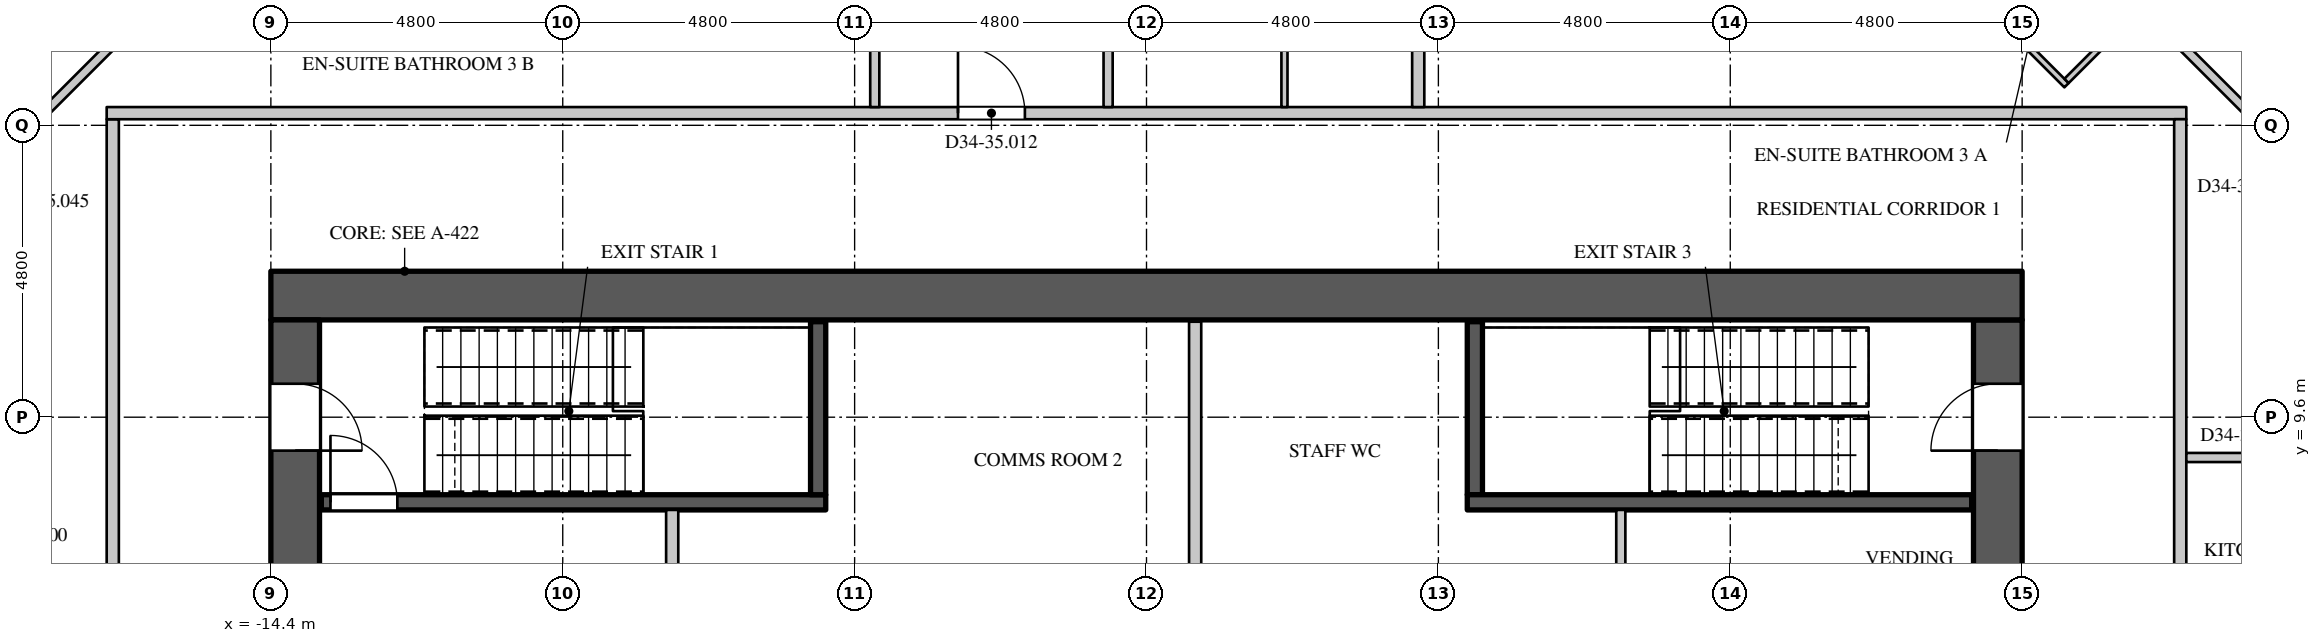
"""IFC4 building model, lengths in metres.
Left out: names, types, materials, properties, quantities, classifications, styles, units other than length and angle.
Written with IfcOpenShell. Run it as: python <this file> out.ifc"""

import sys

from ifc_helpers import new_model, si_unit, direction, frame, frame_2d, origin, place, context, subcontext, project, spatial, rectangle, extrude, element, fill, save


model = new_model("IFC4")
c1 = context("Model", 3, precision=1e-05, world=origin(), true_north=direction((0.0, 1.0)))
c2 = subcontext(c1, "Body", "Model", "MODEL_VIEW")
j1 = project(units=[si_unit("LENGTHUNIT", "METRE"), si_unit("PLANEANGLEUNIT", "RADIAN")], contexts=[c1])
p1 = place(None, origin())
s1 = spatial("IfcSite", under=j1, at=p1, CompositionType="ELEMENT")
p2 = place(p1, origin())
s2 = spatial("IfcBuilding", under=s1, at=p2, CompositionType="ELEMENT")
p3 = place(p2, frame((0.0, 0.0, 148.5)))
s3 = spatial("IfcBuildingStorey", under=s2, at=p3, CompositionType="ELEMENT", Elevation=148.5)
p4 = place(p3, frame((-14.4, 11.6, 0.0), z_axis=(0.0, 0.0, 1.0), x_axis=(1.0, 0.0, 0.0)))
e1 = element("IfcWall", 1, at=p4, inside=s3, PredefinedType="SHEAR", context=c2, shape_type="SweptSolid", body=[
    extrude(rectangle(XDim=28.8, YDim=0.8, at=frame_2d((14.4, 0.0))), origin(), (0.0, 0.0, 1.0), 4.2),
])
p5 = place(p3, frame((14.0, -11.2, 0.0), z_axis=(0.0, 0.0, 1.0), x_axis=(0.0, 1.0, 0.0)))
e2 = element("IfcWall", 2, at=p5, inside=s3, PredefinedType="SHEAR", context=c2, shape_type="SweptSolid", body=[
    extrude(rectangle(XDim=22.4, YDim=0.8, at=frame_2d((11.2, 0.0))), origin(), (0.0, 0.0, 1.0), 4.2),
])
p6 = place(p5, frame((20.25, 0.0, 0.0)))
e3 = element("IfcOpeningElement", 3, at=p6, cuts=e2, PredefinedType="OPENING", context=c2, shape_type="SweptSolid", body=[
    extrude(rectangle(XDim=1.1, YDim=2.2, at=frame_2d((0.55, 1.1))), frame((0.0, 0.41, 0.0), z_axis=(0.0, -1.0, 0.0), x_axis=(1.0, 0.0, 0.0)), (0.0, 0.0, 1.0), 0.82),
])
p7 = place(p5, frame((1.05, 0.0, 0.0)))
e4 = element("IfcOpeningElement", 4, at=p7, cuts=e2, PredefinedType="OPENING", context=c2, shape_type="SweptSolid", body=[
    extrude(rectangle(XDim=1.1, YDim=2.2, at=frame_2d((0.55, 1.1))), frame((0.0, 0.41, 0.0), z_axis=(0.0, -1.0, 0.0), x_axis=(1.0, 0.0, 0.0)), (0.0, 0.0, 1.0), 0.82),
])
p8 = place(p5, frame((14.75, 0.0, 0.0)))
e5 = element("IfcOpeningElement", 5, at=p8, cuts=e2, PredefinedType="OPENING", context=c2, shape_type="SweptSolid", body=[
    extrude(rectangle(XDim=1.5, YDim=2.4, at=frame_2d((0.75, 1.2))), frame((0.0, 0.41, 0.0), z_axis=(0.0, -1.0, 0.0), x_axis=(1.0, 0.0, 0.0)), (0.0, 0.0, 1.0), 0.82),
])
p9 = place(p5, frame((6.15, 0.0, 0.0)))
e6 = element("IfcOpeningElement", 6, at=p9, cuts=e2, PredefinedType="OPENING", context=c2, shape_type="SweptSolid", body=[
    extrude(rectangle(XDim=1.5, YDim=2.4, at=frame_2d((0.75, 1.2))), frame((0.0, 0.41, 0.0), z_axis=(0.0, -1.0, 0.0), x_axis=(1.0, 0.0, 0.0)), (0.0, 0.0, 1.0), 0.82),
])
p10 = place(p3, frame((-14.0, -11.2, 0.0), z_axis=(0.0, 0.0, 1.0), x_axis=(0.0, 1.0, 0.0)))
e7 = element("IfcWall", 7, at=p10, inside=s3, PredefinedType="SHEAR", context=c2, shape_type="SweptSolid", body=[
    extrude(rectangle(XDim=22.4, YDim=0.8, at=frame_2d((11.2, 0.0))), origin(), (0.0, 0.0, 1.0), 4.2),
])
p11 = place(p10, frame((20.25, 0.0, 0.0)))
e8 = element("IfcOpeningElement", 8, at=p11, cuts=e7, PredefinedType="OPENING", context=c2, shape_type="SweptSolid", body=[
    extrude(rectangle(XDim=1.1, YDim=2.2, at=frame_2d((0.55, 1.1))), frame((0.0, 0.41, 0.0), z_axis=(0.0, -1.0, 0.0), x_axis=(1.0, 0.0, 0.0)), (0.0, 0.0, 1.0), 0.82),
])
p12 = place(p10, frame((1.05, 0.0, 0.0)))
e9 = element("IfcOpeningElement", 9, at=p12, cuts=e7, PredefinedType="OPENING", context=c2, shape_type="SweptSolid", body=[
    extrude(rectangle(XDim=1.1, YDim=2.2, at=frame_2d((0.55, 1.1))), frame((0.0, 0.41, 0.0), z_axis=(0.0, -1.0, 0.0), x_axis=(1.0, 0.0, 0.0)), (0.0, 0.0, 1.0), 0.82),
])
p13 = place(p10, frame((15.95, 0.0, 0.0)))
e10 = element("IfcOpeningElement", 10, at=p13, cuts=e7, PredefinedType="OPENING", context=c2, shape_type="SweptSolid", body=[
    extrude(rectangle(XDim=1.5, YDim=2.4, at=frame_2d((0.75, 1.2))), frame((0.0, 0.41, 0.0), z_axis=(0.0, -1.0, 0.0), x_axis=(1.0, 0.0, 0.0)), (0.0, 0.0, 1.0), 0.82),
])
p14 = place(p10, frame((4.95, 0.0, 0.0)))
e11 = element("IfcOpeningElement", 11, at=p14, cuts=e7, PredefinedType="OPENING", context=c2, shape_type="SweptSolid", body=[
    extrude(rectangle(XDim=1.5, YDim=2.4, at=frame_2d((0.75, 1.2))), frame((0.0, 0.41, 0.0), z_axis=(0.0, -1.0, 0.0), x_axis=(1.0, 0.0, 0.0)), (0.0, 0.0, 1.0), 0.82),
])
p15 = place(p3, frame((-17.0, -14.5, 0.0), z_axis=(0.0, 0.0, 1.0), x_axis=(0.0, 1.0, 0.0)))
e12 = element("IfcWall", 12, at=p15, inside=s3, PredefinedType="PARTITIONING", context=c2, shape_type="SweptSolid", body=[
    extrude(rectangle(XDim=29.0, YDim=0.2, at=frame_2d((14.5, 0.0))), origin(), (0.0, 0.0, 1.0), 3.798),
])
p16 = place(p15, frame((13.9, 0.0, 0.0)))
e13 = element("IfcOpeningElement", 13, at=p16, cuts=e12, PredefinedType="OPENING", context=c2, shape_type="SweptSolid", body=[
    extrude(rectangle(XDim=1.1, YDim=2.4, at=frame_2d((0.55, 1.2))), frame((0.0, 0.11, 0.0), z_axis=(0.0, -1.0, 0.0), x_axis=(1.0, 0.0, 0.0)), (0.0, 0.0, 1.0), 0.22),
])
p17 = place(p3, frame((-17.1, 14.6, 0.0), z_axis=(0.0, 0.0, 1.0), x_axis=(1.0, 0.0, 0.0)))
e14 = element("IfcWall", 14, at=p17, inside=s3, PredefinedType="PARTITIONING", context=c2, shape_type="SweptSolid", body=[
    extrude(rectangle(XDim=34.2, YDim=0.2, at=frame_2d((17.1, 0.0))), origin(), (0.0, 0.0, 1.0), 3.798),
])
p18 = place(p17, frame((14.0, 0.0, 0.0)))
e15 = element("IfcOpeningElement", 15, at=p18, cuts=e14, PredefinedType="OPENING", context=c2, shape_type="SweptSolid", body=[
    extrude(rectangle(XDim=1.1, YDim=2.4, at=frame_2d((0.55, 1.2))), frame((0.0, 0.11, 0.0), z_axis=(0.0, -1.0, 0.0), x_axis=(1.0, 0.0, 0.0)), (0.0, 0.0, 1.0), 0.22),
])
p19 = place(p3, frame((17.0, -14.5, 0.0), z_axis=(0.0, 0.0, 1.0), x_axis=(0.0, 1.0, 0.0)))
e16 = element("IfcWall", 16, at=p19, inside=s3, PredefinedType="PARTITIONING", context=c2, shape_type="SweptSolid", body=[
    extrude(rectangle(XDim=29.0, YDim=0.2, at=frame_2d((14.5, 0.0))), origin(), (0.0, 0.0, 1.0), 3.798),
])
p20 = place(p19, frame((15.9, 0.0, 0.0)))
e17 = element("IfcOpeningElement", 17, at=p20, cuts=e16, PredefinedType="OPENING", context=c2, shape_type="SweptSolid", body=[
    extrude(rectangle(XDim=1.1, YDim=2.4, at=frame_2d((0.55, 1.2))), frame((0.0, 0.11, 0.0), z_axis=(0.0, -1.0, 0.0), x_axis=(1.0, 0.0, 0.0)), (0.0, 0.0, 1.0), 0.22),
])
p21 = place(p3, frame((-21.347, 11.388, 0.0), z_axis=(0.0, 0.0, 1.0), x_axis=(0.707106781187, 0.707106781187, 0.0)))
e18 = element("IfcWall", 18, at=p21, inside=s3, PredefinedType="PARTITIONING", context=c2, shape_type="SweptSolid", body=[
    extrude(rectangle(XDim=8.836, YDim=0.15, at=frame_2d((4.418, 0.0))), origin(), (0.0, 0.0, 1.0), 3.798),
])
p22 = place(p21, frame((2.75, 0.0, 0.0)))
e19 = element("IfcOpeningElement", 19, at=p22, cuts=e18, PredefinedType="OPENING", context=c2, shape_type="SweptSolid", body=[
    extrude(rectangle(XDim=0.95, YDim=2.2, at=frame_2d((0.475, 1.1))), frame((0.0, 0.085, 0.0), z_axis=(0.0, -1.0, 0.0), x_axis=(1.0, 0.0, 0.0)), (0.0, 0.0, 1.0), 0.17),
])
p23 = place(p21, frame((7.45, 0.0, 0.0)))
e20 = element("IfcOpeningElement", 20, at=p23, cuts=e18, PredefinedType="OPENING", context=c2, shape_type="SweptSolid", body=[
    extrude(rectangle(XDim=0.95, YDim=2.2, at=frame_2d((0.475, 1.1))), frame((0.0, 0.085, 0.0), z_axis=(0.0, -1.0, 0.0), x_axis=(1.0, 0.0, 0.0)), (0.0, 0.0, 1.0), 0.17),
])
p24 = place(p3, frame((-4.469, 14.7, 0.0), z_axis=(0.0, 0.0, 1.0), x_axis=(0.0, 1.0, 0.0)))
e21 = element("IfcWall", 21, at=p24, inside=s3, PredefinedType="PARTITIONING", context=c2, shape_type="SweptSolid", body=[
    extrude(rectangle(XDim=4.92, YDim=0.15, at=frame_2d((2.46, 0.0))), origin(), (0.0, 0.0, 1.0), 3.15),
])
p25 = place(p24, frame((1.95, 0.0, 0.0)))
e22 = element("IfcOpeningElement", 22, at=p25, cuts=e21, PredefinedType="OPENING", context=c2, shape_type="SweptSolid", body=[
    extrude(rectangle(XDim=0.95, YDim=2.2, at=frame_2d((0.475, 1.1))), frame((0.0, 0.085, 0.0), z_axis=(0.0, -1.0, 0.0), x_axis=(1.0, 0.0, 0.0)), (0.0, 0.0, 1.0), 0.17),
])
p26 = place(p3, frame((-0.631, 14.7, 0.0), z_axis=(0.0, 0.0, 1.0), x_axis=(0.0, 1.0, 0.0)))
e23 = element("IfcWall", 23, at=p26, inside=s3, PredefinedType="PARTITIONING", context=c2, shape_type="SweptSolid", body=[
    extrude(rectangle(XDim=6.025, YDim=0.15, at=frame_2d((3.013, 0.0))), origin(), (0.0, 0.0, 1.0), 3.798),
])
p27 = place(p26, frame((2.5, 0.0, 0.0)))
e24 = element("IfcOpeningElement", 24, at=p27, cuts=e23, PredefinedType="OPENING", context=c2, shape_type="SweptSolid", body=[
    extrude(rectangle(XDim=0.95, YDim=2.2, at=frame_2d((0.475, 1.1))), frame((0.0, 0.085, 0.0), z_axis=(0.0, -1.0, 0.0), x_axis=(1.0, 0.0, 0.0)), (0.0, 0.0, 1.0), 0.17),
])
p28 = place(p3, frame((7.8, 5.9, 0.0), z_axis=(0.0, 0.0, 1.0), x_axis=(0.0, 1.0, 0.0)))
e25 = element("IfcWall", 25, at=p28, inside=s3, PredefinedType="PARTITIONING", context=c2, shape_type="SweptSolid", body=[
    extrude(rectangle(XDim=2.175, YDim=0.15, at=frame_2d((1.087, 0.0))), origin(), (0.0, 0.0, 1.0), 3.798),
])
p29 = place(p3, frame((16.367, 16.367, 0.0), z_axis=(0.0, 0.0, 1.0), x_axis=(0.707106781187, -0.707106781187, 0.0)))
e26 = element("IfcWall", 26, at=p29, inside=s3, PredefinedType="PARTITIONING", context=c2, shape_type="SweptSolid", body=[
    extrude(rectangle(XDim=7.192, YDim=0.15, at=frame_2d((3.596, 0.0))), origin(), (0.0, 0.0, 1.0), 3.798),
])
p30 = place(p29, frame((6.05, 0.0, 0.0)))
e27 = element("IfcOpeningElement", 27, at=p30, cuts=e26, PredefinedType="OPENING", context=c2, shape_type="SweptSolid", body=[
    extrude(rectangle(XDim=0.95, YDim=2.2, at=frame_2d((0.475, 1.1))), frame((0.0, 0.085, 0.0), z_axis=(0.0, -1.0, 0.0), x_axis=(1.0, 0.0, 0.0)), (0.0, 0.0, 1.0), 0.17),
])
p31 = place(p29, frame((3.35, 0.0, 0.0)))
e28 = element("IfcOpeningElement", 28, at=p31, cuts=e26, PredefinedType="OPENING", context=c2, shape_type="SweptSolid", body=[
    extrude(rectangle(XDim=0.95, YDim=2.2, at=frame_2d((0.475, 1.1))), frame((0.0, 0.085, 0.0), z_axis=(0.0, -1.0, 0.0), x_axis=(1.0, 0.0, 0.0)), (0.0, 0.0, 1.0), 0.17),
])
p32 = place(p3, frame((17.1, 8.937, 0.0), z_axis=(0.0, 0.0, 1.0), x_axis=(1.0, 0.0, 0.0)))
e29 = element("IfcWall", 29, at=p32, inside=s3, PredefinedType="PARTITIONING", context=c2, shape_type="SweptSolid", body=[
    extrude(rectangle(XDim=9.355, YDim=0.15, at=frame_2d((4.677, 0.0))), origin(), (0.0, 0.0, 1.0), 3.798),
])
p33 = place(p32, frame((6.05, 0.0, 0.0)))
e30 = element("IfcOpeningElement", 30, at=p33, cuts=e29, PredefinedType="OPENING", context=c2, shape_type="SweptSolid", body=[
    extrude(rectangle(XDim=1.5, YDim=2.2, at=frame_2d((0.75, 1.1))), frame((0.0, 0.085, 0.0), z_axis=(0.0, -1.0, 0.0), x_axis=(1.0, 0.0, 0.0)), (0.0, 0.0, 1.0), 0.17),
])
p34 = place(p32, frame((1.85, 0.0, 0.0)))
e31 = element("IfcOpeningElement", 31, at=p34, cuts=e29, PredefinedType="OPENING", context=c2, shape_type="SweptSolid", body=[
    extrude(rectangle(XDim=0.95, YDim=2.2, at=frame_2d((0.475, 1.1))), frame((0.0, 0.085, 0.0), z_axis=(0.0, -1.0, 0.0), x_axis=(1.0, 0.0, 0.0)), (0.0, 0.0, 1.0), 0.17),
])
p35 = place(p3, frame((4.469, 14.7, 0.0), z_axis=(0.0, 0.0, 1.0), x_axis=(0.0, 1.0, 0.0)))
e32 = element("IfcWall", 32, at=p35, inside=s3, PredefinedType="PARTITIONING", context=c2, shape_type="SweptSolid", body=[
    extrude(rectangle(XDim=10.95, YDim=0.2, at=frame_2d((5.475, 0.0))), origin(), (0.0, 0.0, 1.0), 3.15),
])
p36 = place(p3, frame((-7.8, 5.8, 0.0), z_axis=(0.0, 0.0, 1.0), x_axis=(0.0, 1.0, 0.0)))
e33 = element("IfcWall", 33, at=p36, inside=s3, PredefinedType="PARTITIONING", context=c2, shape_type="SweptSolid", body=[
    extrude(rectangle(XDim=2.275, YDim=0.2, at=frame_2d((1.137, 0.0))), origin(), (0.0, 0.0, 1.0), 3.798),
])
p37 = place(p3, frame((0.8, 5.9, 0.0), z_axis=(0.0, 0.0, 1.0), x_axis=(0.0, 1.0, 0.0)))
e34 = element("IfcWall", 34, at=p37, inside=s3, PredefinedType="PARTITIONING", context=c2, shape_type="SweptSolid", body=[
    extrude(rectangle(XDim=5.27, YDim=0.2, at=frame_2d((2.635, 0.0))), origin(), (0.0, 0.0, 1.0), 3.798),
])
p38 = place(p3, frame((-13.57, 8.2, 0.0), z_axis=(0.0, 0.0, 1.0), x_axis=(1.0, 0.0, 0.0)))
e35 = element("IfcWall", 35, at=p38, inside=s3, PredefinedType="SHEAR", context=c2, shape_type="SweptSolid", body=[
    extrude(rectangle(XDim=8.295, YDim=0.25, at=frame_2d((4.147, 0.0))), origin(), (0.0, 0.0, 1.0), 3.798),
])
p39 = place(p38, frame((0.15, 0.0, 0.0)))
e36 = element("IfcOpeningElement", 36, at=p39, cuts=e35, PredefinedType="OPENING", context=c2, shape_type="SweptSolid", body=[
    extrude(rectangle(XDim=1.1, YDim=2.2, at=frame_2d((0.55, 1.1))), frame((0.0, 0.135, 0.0), z_axis=(0.0, -1.0, 0.0), x_axis=(1.0, 0.0, 0.0)), (0.0, 0.0, 1.0), 0.27),
])
for number, where, z_axis, x_axis in (
    (37, (-5.4, 8.325, 0.0), (0.0, 0.0, 1.0), (0.0, 1.0, 0.0)),
    (38, (5.4, 8.325, 0.0), (0.0, 0.0, 1.0), (0.0, 1.0, 0.0)),
):
    element("IfcWall", number, at=place(p3, frame(where, z_axis=z_axis, x_axis=x_axis)), inside=s3, PredefinedType="SHEAR", context=c2, shape_type="SweptSolid", body=[
        extrude(rectangle(XDim=2.845, YDim=0.25, at=frame_2d((1.422, 0.0))), origin(), (0.0, 0.0, 1.0), 3.798),
    ])
p40 = place(p3, frame((5.275, 8.2, 0.0), z_axis=(0.0, 0.0, 1.0), x_axis=(1.0, 0.0, 0.0)))
e39 = element("IfcWall", 39, at=p40, inside=s3, PredefinedType="SHEAR", context=c2, shape_type="SweptSolid", body=[
    extrude(rectangle(XDim=8.295, YDim=0.25, at=frame_2d((4.147, 0.0))), origin(), (0.0, 0.0, 1.0), 3.798),
])
p41 = place(p3, frame((2.269, 14.7, 0.0), z_axis=(0.0, 0.0, 1.0), x_axis=(0.0, 1.0, 0.0)))
e40 = element("IfcWall", 40, at=p41, inside=s3, PredefinedType="PARTITIONING", context=c2, shape_type="SweptSolid", body=[
    extrude(rectangle(XDim=6.025, YDim=0.1, at=frame_2d((3.013, 0.0))), origin(), (0.0, 0.0, 1.0), 3.798),
])
p42 = place(p3, frame((13.15, 17.039, 0.0), z_axis=(0.0, 0.0, 1.0), x_axis=(0.707106781187, -0.707106781187, 0.0)))
e41 = element("IfcWall", 41, at=p42, inside=s3, PredefinedType="PARTITIONING", context=c2, shape_type="SweptSolid", body=[
    extrude(rectangle(XDim=2.8, YDim=0.1, at=frame_2d((1.4, 0.0))), origin(), (0.0, 0.0, 1.0), 3.798),
])
p43 = place(p3, frame((15.13, 15.13, 0.0), z_axis=(0.0, 0.0, 1.0), x_axis=(0.707106781187, 0.707106781187, 0.0)))
e42 = element("IfcWall", 42, at=p43, inside=s3, PredefinedType="PARTITIONING", context=c2, shape_type="SweptSolid", body=[
    extrude(rectangle(XDim=1.73, YDim=0.1, at=frame_2d((0.865, 0.0))), origin(), (0.0, 0.0, 1.0), 3.798),
])
p44 = place(p39, origin())
e43 = element("IfcDoor", 43, at=p44, inside=s3, OperationType="SINGLE_SWING_LEFT", PredefinedType="DOOR", context=c2, shape_type="SweptSolid", body=[
    extrude(rectangle(XDim=1.1, YDim=2.2, at=frame_2d((0.55, 1.1))), frame((0.0, 0.025, 0.0), z_axis=(0.0, -1.0, 0.0), x_axis=(1.0, 0.0, 0.0)), (0.0, 0.0, 1.0), 0.05),
])
fill(e36, e43)
p45 = place(p11, origin())
e44 = element("IfcDoor", 44, at=p45, inside=s3, OperationType="SINGLE_SWING_RIGHT", PredefinedType="DOOR", context=c2, shape_type="SweptSolid", body=[
    extrude(rectangle(XDim=1.1, YDim=2.2, at=frame_2d((0.55, 1.1))), frame((0.0, -0.345, 0.0), z_axis=(0.0, -1.0, 0.0), x_axis=(1.0, 0.0, 0.0)), (0.0, 0.0, 1.0), 0.05),
])
fill(e8, e44)
p46 = place(p6, origin())
e45 = element("IfcDoor", 45, at=p46, inside=s3, OperationType="SINGLE_SWING_LEFT", PredefinedType="DOOR", context=c2, shape_type="SweptSolid", body=[
    extrude(rectangle(XDim=1.1, YDim=2.2, at=frame_2d((0.55, 1.1))), frame((0.0, 0.395, 0.0), z_axis=(0.0, -1.0, 0.0), x_axis=(1.0, 0.0, 0.0)), (0.0, 0.0, 1.0), 0.05),
])
fill(e3, e45)
p47 = place(p18, origin())
e46 = element("IfcDoor", 46, at=p47, inside=s3, OperationType="SINGLE_SWING_LEFT", PredefinedType="DOOR", context=c2, shape_type="SweptSolid", body=[
    extrude(rectangle(XDim=1.1, YDim=2.4, at=frame_2d((0.55, 1.2))), frame((0.0, 0.025, 0.0), z_axis=(0.0, -1.0, 0.0), x_axis=(1.0, 0.0, 0.0)), (0.0, 0.0, 1.0), 0.05),
])
fill(e15, e46)
save(model, sys.argv[1])
